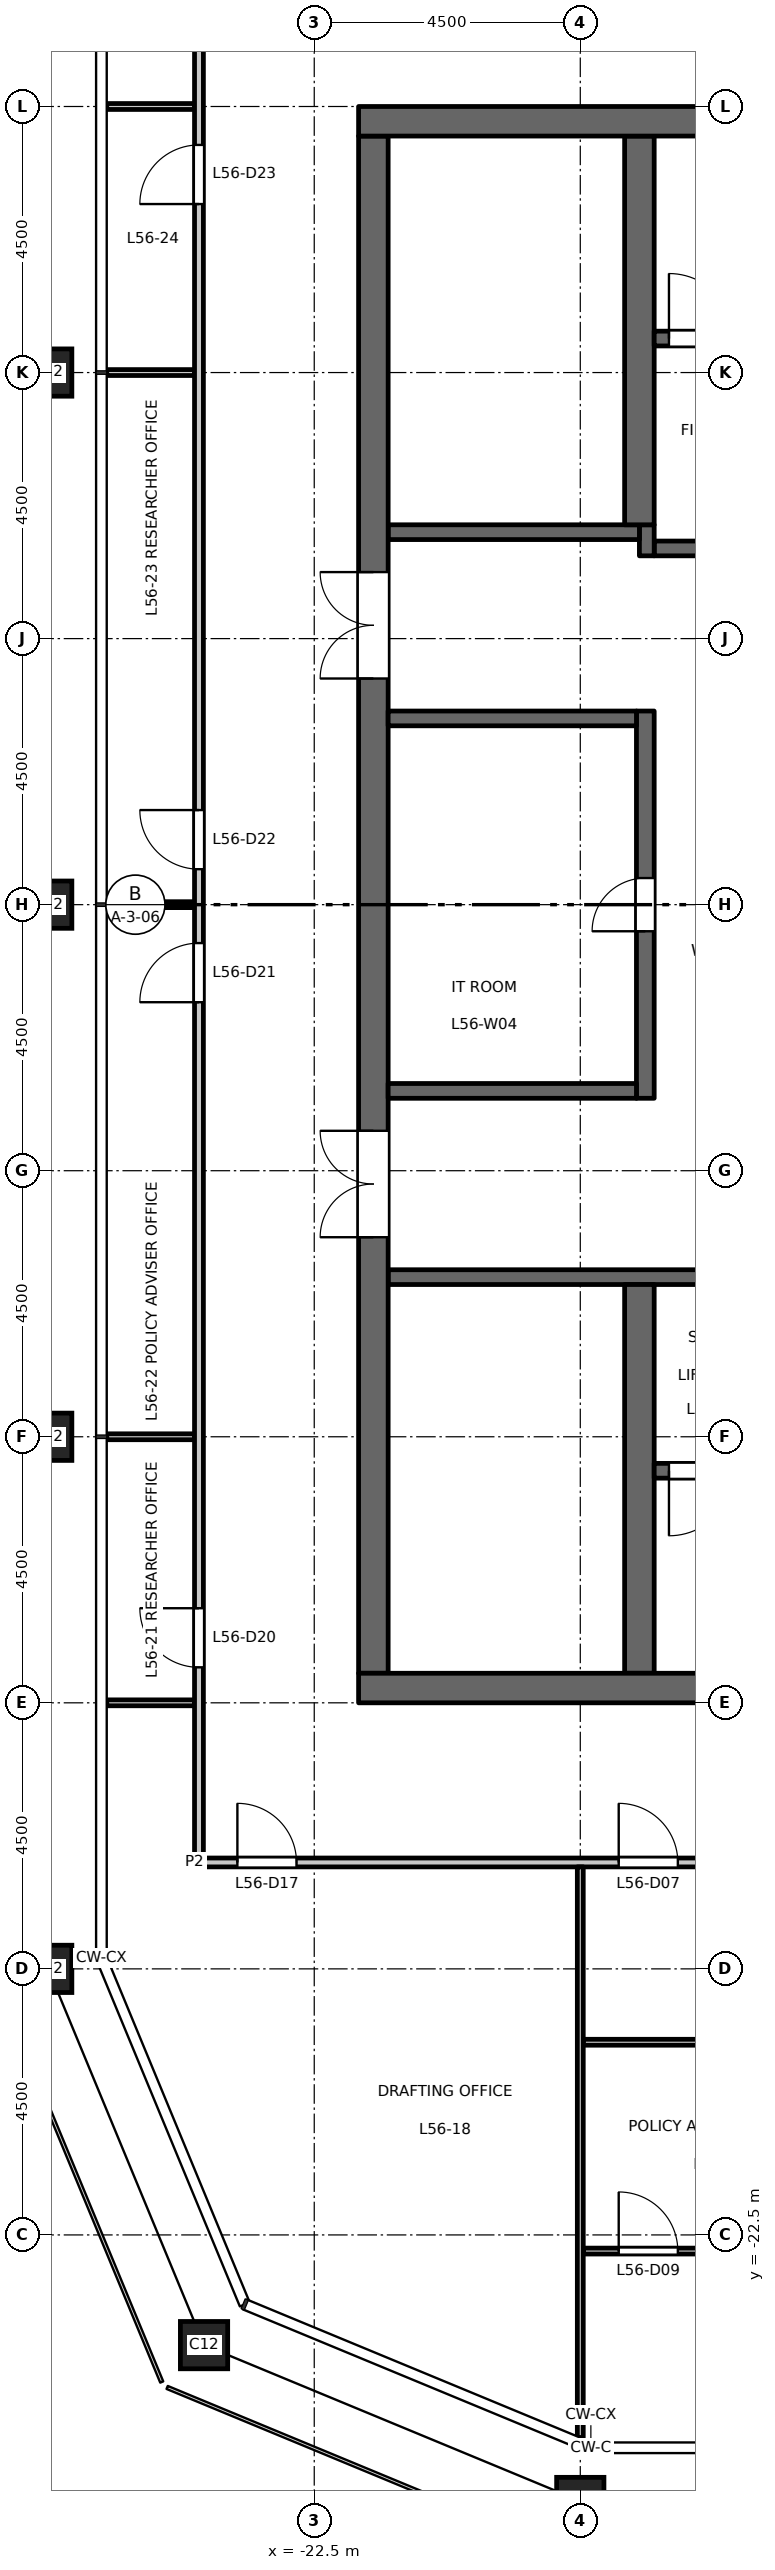
"""IFC4 building model, lengths in metres.
Left out: names, types, materials, properties, quantities, classifications, styles, units other than length and angle.
Written with IfcOpenShell. Run it as: python <this file> out.ifc"""

import sys

from ifc_helpers import new_model, si_unit, direction, frame, frame_2d, origin, origin_2d, place, context, subcontext, project, spatial, rectangle, hollow_rectangle, extrude, element, fill, save


model = new_model("IFC4")
c1 = context("Model", 3, precision=1e-05, world=origin(), true_north=direction((0.0, 1.0)))
c2 = subcontext(c1, "Body", "Model", "MODEL_VIEW")
j1 = project(units=[si_unit("LENGTHUNIT", "METRE"), si_unit("PLANEANGLEUNIT", "RADIAN")], contexts=[c1])
p1 = place(None, origin())
s1 = spatial("IfcSite", under=j1, at=p1, CompositionType="ELEMENT")
p2 = place(p1, origin())
s2 = spatial("IfcBuilding", under=s1, at=p2, CompositionType="ELEMENT")
p3 = place(p2, frame((0.0, 0.0, 260.2)))
s3 = spatial("IfcBuildingStorey", under=s2, at=p3, CompositionType="ELEMENT", Elevation=260.2)
for number, where, z_axis, x_axis in (
    (1, (-18.0, -27.0, 0.0), (0.0, 0.0, 1.0), (1.0, 0.0, 0.0)),
    (2, (-27.0, 9.0, 0.0), (0.0, 0.0, 1.0), (1.0, 0.0, 0.0)),
    (3, (-27.0, 0.0, 0.0), (0.0, 0.0, 1.0), (1.0, 0.0, 0.0)),
    (4, (-27.0, -9.0, 0.0), (0.0, 0.0, 1.0), (1.0, 0.0, 0.0)),
    (5, (-27.0, -18.0, 0.0), (0.0, 0.0, 1.0), (1.0, 0.0, 0.0)),
    (6, (-24.364, -24.364, 0.0), (0.0, 0.0, 1.0), (1.0, 0.0, 0.0)),
):
    element("IfcColumn", number, at=place(p3, frame(where, z_axis=z_axis, x_axis=x_axis)), inside=s3, PredefinedType="COLUMN", context=c2, shape_type="SweptSolid", body=[
        extrude(hollow_rectangle(XDim=0.8, YDim=0.8, WallThickness=0.045, at=origin_2d()), origin(), (0.0, 0.0, 1.0), 4.5),
    ])
p4 = place(p3, frame((-12.15, 6.025, 0.0), z_axis=(0.0, 0.0, 1.0), x_axis=(-1.0, 0.0, 0.0)))
e7 = element("IfcWall", 7, at=p4, inside=s3, PredefinedType="SHEAR", context=c2, shape_type="SweptSolid", body=[
    extrude(rectangle(XDim=4.6, YDim=0.25, at=frame_2d((2.3, 0.0))), origin(), (0.0, 0.0, 1.0), 4.35),
])
p5 = place(p4, frame((1.8, 0.0, 0.0)))
e8 = element("IfcOpeningElement", 8, at=p5, cuts=e7, PredefinedType="OPENING", context=c2, shape_type="SweptSolid", body=[
    extrude(rectangle(XDim=1.0, YDim=2.1, at=frame_2d((0.5, 1.05))), frame((0.0, 0.135, 0.0), z_axis=(0.0, -1.0, 0.0), x_axis=(1.0, 0.0, 0.0)), (0.0, 0.0, 1.0), 0.27),
])
p6 = place(p3, frame((-16.875, 5.9, 0.0), z_axis=(0.0, 0.0, 1.0), x_axis=(0.0, 1.0, 0.0)))
e9 = element("IfcWall", 9, at=p6, inside=s3, PredefinedType="SHEAR", context=c2, shape_type="SweptSolid", body=[
    extrude(rectangle(XDim=0.525, YDim=0.25, at=frame_2d((0.263, 0.0))), origin(), (0.0, 0.0, 1.0), 4.35),
])
p7 = place(p3, frame((-17.0, 6.3, 0.0), z_axis=(0.0, 0.0, 1.0), x_axis=(-1.0, 0.0, 0.0)))
e10 = element("IfcWall", 10, at=p7, inside=s3, PredefinedType="SHEAR", context=c2, shape_type="SweptSolid", body=[
    extrude(rectangle(XDim=4.25, YDim=0.25, at=frame_2d((2.125, 0.0))), origin(), (0.0, 0.0, 1.0), 4.35),
])
p8 = place(p3, frame((-12.15, -6.3, 0.0), z_axis=(0.0, 0.0, 1.0), x_axis=(-1.0, 0.0, 0.0)))
e11 = element("IfcWall", 11, at=p8, inside=s3, PredefinedType="SHEAR", context=c2, shape_type="SweptSolid", body=[
    extrude(rectangle(XDim=9.1, YDim=0.25, at=frame_2d((4.55, 0.0))), origin(), (0.0, 0.0, 1.0), 4.35),
])
p9 = place(p8, frame((1.8, 0.0, 0.0)))
e12 = element("IfcOpeningElement", 12, at=p9, cuts=e11, PredefinedType="OPENING", context=c2, shape_type="SweptSolid", body=[
    extrude(rectangle(XDim=1.0, YDim=2.1, at=frame_2d((0.5, 1.05))), frame((0.0, 0.135, 0.0), z_axis=(0.0, -1.0, 0.0), x_axis=(1.0, 0.0, 0.0)), (0.0, 0.0, 1.0), 0.27),
])
p10 = place(p3, frame((-21.5, -13.0, 0.0), z_axis=(0.0, 0.0, 1.0), x_axis=(0.0, 1.0, 0.0)))
e13 = element("IfcWall", 13, at=p10, inside=s3, PredefinedType="SHEAR", context=c2, shape_type="SweptSolid", body=[
    extrude(rectangle(XDim=26.0, YDim=0.5, at=frame_2d((13.0, 0.0))), origin(), (0.0, 0.0, 1.0), 4.35),
])
p11 = place(p10, frame((16.825, 0.0, 0.0)))
e14 = element("IfcOpeningElement", 14, at=p11, cuts=e13, PredefinedType="OPENING", context=c2, shape_type="SweptSolid", body=[
    extrude(rectangle(XDim=1.8, YDim=2.1, at=frame_2d((0.9, 1.05))), frame((0.0, 0.26, 0.0), z_axis=(0.0, -1.0, 0.0), x_axis=(1.0, 0.0, 0.0)), (0.0, 0.0, 1.0), 0.52),
])
p12 = place(p10, frame((7.375, 0.0, 0.0)))
e15 = element("IfcOpeningElement", 15, at=p12, cuts=e13, PredefinedType="OPENING", context=c2, shape_type="SweptSolid", body=[
    extrude(rectangle(XDim=1.8, YDim=2.1, at=frame_2d((0.9, 1.05))), frame((0.0, 0.26, 0.0), z_axis=(0.0, -1.0, 0.0), x_axis=(1.0, 0.0, 0.0)), (0.0, 0.0, 1.0), 0.52),
])
p13 = place(p3, frame((-16.9, -3.275, 0.0), z_axis=(0.0, 0.0, 1.0), x_axis=(0.0, 1.0, 0.0)))
e16 = element("IfcWall", 16, at=p13, inside=s3, PredefinedType="SHEAR", context=c2, shape_type="SweptSolid", body=[
    extrude(rectangle(XDim=6.55, YDim=0.3, at=frame_2d((3.275, 0.0))), origin(), (0.0, 0.0, 1.0), 4.35),
])
p14 = place(p13, frame((2.825, 0.0, 0.0)))
e17 = element("IfcOpeningElement", 17, at=p14, cuts=e16, PredefinedType="OPENING", context=c2, shape_type="SweptSolid", body=[
    extrude(rectangle(XDim=0.9, YDim=2.1, at=frame_2d((0.45, 1.05))), frame((0.0, 0.16, 0.0), z_axis=(0.0, -1.0, 0.0), x_axis=(1.0, 0.0, 0.0)), (0.0, 0.0, 1.0), 0.32),
])
for number, where, z_axis, x_axis in (
    (18, (-17.05, 3.15, 0.0), (0.0, 0.0, 1.0), (-1.0, 0.0, 0.0)),
    (19, (-17.05, -3.15, 0.0), (0.0, 0.0, 1.0), (-1.0, 0.0, 0.0)),
):
    element("IfcWall", number, at=place(p3, frame(where, z_axis=z_axis, x_axis=x_axis)), inside=s3, PredefinedType="SHEAR", context=c2, shape_type="SweptSolid", body=[
        extrude(rectangle(XDim=4.2, YDim=0.25, at=frame_2d((2.1, 0.0))), origin(), (0.0, 0.0, 1.0), 4.35),
    ])
for number, where, z_axis, x_axis in (
    (20, (-17.0, 6.425, 0.0), (0.0, 0.0, 1.0), (0.0, 1.0, 0.0)),
    (21, (-17.0, -13.0, 0.0), (0.0, 0.0, 1.0), (0.0, 1.0, 0.0)),
):
    element("IfcWall", number, at=place(p3, frame(where, z_axis=z_axis, x_axis=x_axis)), inside=s3, PredefinedType="SHEAR", context=c2, shape_type="SweptSolid", body=[
        extrude(rectangle(XDim=6.575, YDim=0.5, at=frame_2d((3.288, 0.0))), origin(), (0.0, 0.0, 1.0), 4.35),
    ])
p15 = place(p3, frame((-8.75, 9.575, 0.0), z_axis=(0.0, 0.0, 1.0), x_axis=(-1.0, 0.0, 0.0)))
e22 = element("IfcWall", 22, at=p15, inside=s3, PredefinedType="SHEAR", context=c2, shape_type="SweptSolid", body=[
    extrude(rectangle(XDim=8.0, YDim=0.25, at=frame_2d((4.0, 0.0))), origin(), (0.0, 0.0, 1.0), 4.35),
])
p16 = place(p15, frame((6.65, 0.0, 0.0)))
e23 = element("IfcOpeningElement", 23, at=p16, cuts=e22, PredefinedType="OPENING", context=c2, shape_type="SweptSolid", body=[
    extrude(rectangle(XDim=1.1, YDim=2.1, at=frame_2d((0.55, 1.05))), frame((0.0, 0.135, 0.0), z_axis=(0.0, -1.0, 0.0), x_axis=(1.0, 0.0, 0.0)), (0.0, 0.0, 1.0), 0.27),
])
p17 = place(p3, frame((-8.75, -9.575, 0.0), z_axis=(0.0, 0.0, 1.0), x_axis=(-1.0, 0.0, 0.0)))
e24 = element("IfcWall", 24, at=p17, inside=s3, PredefinedType="SHEAR", context=c2, shape_type="SweptSolid", body=[
    extrude(rectangle(XDim=8.0, YDim=0.25, at=frame_2d((4.0, 0.0))), origin(), (0.0, 0.0, 1.0), 4.35),
])
p18 = place(p17, frame((6.65, 0.0, 0.0)))
e25 = element("IfcOpeningElement", 25, at=p18, cuts=e24, PredefinedType="OPENING", context=c2, shape_type="SweptSolid", body=[
    extrude(rectangle(XDim=1.1, YDim=2.1, at=frame_2d((0.55, 1.05))), frame((0.0, 0.135, 0.0), z_axis=(0.0, -1.0, 0.0), x_axis=(1.0, 0.0, 0.0)), (0.0, 0.0, 1.0), 0.27),
])
for number, where, z_axis, x_axis in (
    (26, (-8.25, 13.25, 0.0), (0.0, 0.0, 1.0), (-1.0, 0.0, 0.0)),
    (27, (-8.25, -13.25, 0.0), (0.0, 0.0, 1.0), (-1.0, 0.0, 0.0)),
):
    element("IfcWall", number, at=place(p3, frame(where, z_axis=z_axis, x_axis=x_axis)), inside=s3, PredefinedType="SHEAR", context=c2, shape_type="SweptSolid", body=[
        extrude(rectangle(XDim=13.5, YDim=0.5, at=frame_2d((6.75, 0.0))), origin(), (0.0, 0.0, 1.0), 4.35),
    ])
p19 = place(p3, frame((-17.95, -22.773, 0.0), z_axis=(0.0, 0.0, 1.0), x_axis=(1.0, 0.0, 0.0)))
e28 = element("IfcWall", 28, at=p19, inside=s3, PredefinedType="PARTITIONING", context=c2, shape_type="SweptSolid", body=[
    extrude(rectangle(XDim=8.9, YDim=0.1, at=frame_2d((4.45, 0.0))), origin(), (0.0, 0.0, 1.0), 4.35),
])
p20 = place(p19, frame((0.6, 0.0, 0.0)))
e29 = element("IfcOpeningElement", 29, at=p20, cuts=e28, PredefinedType="OPENING", context=c2, shape_type="SweptSolid", body=[
    extrude(rectangle(XDim=1.0, YDim=2.1, at=frame_2d((0.5, 1.05))), frame((0.0, 0.06, 0.0), z_axis=(0.0, -1.0, 0.0), x_axis=(1.0, 0.0, 0.0)), (0.0, 0.0, 1.0), 0.12),
])
p21 = place(p3, frame((-17.95, -19.241, 0.0), z_axis=(0.0, 0.0, 1.0), x_axis=(1.0, 0.0, 0.0)))
e30 = element("IfcWall", 30, at=p21, inside=s3, PredefinedType="PARTITIONING", context=c2, shape_type="SweptSolid", body=[
    extrude(rectangle(XDim=8.9, YDim=0.1, at=frame_2d((4.45, 0.0))), origin(), (0.0, 0.0, 1.0), 4.35),
])
p22 = place(p21, frame((7.35, 0.0, 0.0)))
e31 = element("IfcOpeningElement", 31, at=p22, cuts=e30, PredefinedType="OPENING", context=c2, shape_type="SweptSolid", body=[
    extrude(rectangle(XDim=1.0, YDim=2.1, at=frame_2d((0.5, 1.05))), frame((0.0, 0.06, 0.0), z_axis=(0.0, -1.0, 0.0), x_axis=(1.0, 0.0, 0.0)), (0.0, 0.0, 1.0), 0.12),
])
p23 = place(p3, frame((-24.525, -16.2, 0.0), z_axis=(0.0, 0.0, 1.0), x_axis=(1.0, 0.0, 0.0)))
e32 = element("IfcWall", 32, at=p23, inside=s3, PredefinedType="PARTITIONING", context=c2, shape_type="SweptSolid", body=[
    extrude(rectangle(XDim=49.05, YDim=0.15, at=frame_2d((24.525, 0.0))), origin(), (0.0, 0.0, 1.0), 4.35),
])
p24 = place(p23, frame((7.175, 0.0, 0.0)))
e33 = element("IfcOpeningElement", 33, at=p24, cuts=e32, PredefinedType="OPENING", context=c2, shape_type="SweptSolid", body=[
    extrude(rectangle(XDim=1.0, YDim=2.1, at=frame_2d((0.5, 1.05))), frame((0.0, 0.085, 0.0), z_axis=(0.0, -1.0, 0.0), x_axis=(1.0, 0.0, 0.0)), (0.0, 0.0, 1.0), 0.17),
])
p25 = place(p23, frame((22.925, 0.0, 0.0)))
e34 = element("IfcOpeningElement", 34, at=p25, cuts=e32, PredefinedType="OPENING", context=c2, shape_type="SweptSolid", body=[
    extrude(rectangle(XDim=1.0, YDim=2.1, at=frame_2d((0.5, 1.05))), frame((0.0, 0.085, 0.0), z_axis=(0.0, -1.0, 0.0), x_axis=(1.0, 0.0, 0.0)), (0.0, 0.0, 1.0), 0.17),
])
p26 = place(p23, frame((25.175, 0.0, 0.0)))
e35 = element("IfcOpeningElement", 35, at=p26, cuts=e32, PredefinedType="OPENING", context=c2, shape_type="SweptSolid", body=[
    extrude(rectangle(XDim=1.0, YDim=2.1, at=frame_2d((0.5, 1.05))), frame((0.0, 0.085, 0.0), z_axis=(0.0, -1.0, 0.0), x_axis=(1.0, 0.0, 0.0)), (0.0, 0.0, 1.0), 0.17),
])
p27 = place(p23, frame((36.425, 0.0, 0.0)))
e36 = element("IfcOpeningElement", 36, at=p27, cuts=e32, PredefinedType="OPENING", context=c2, shape_type="SweptSolid", body=[
    extrude(rectangle(XDim=1.0, YDim=2.1, at=frame_2d((0.5, 1.05))), frame((0.0, 0.085, 0.0), z_axis=(0.0, -1.0, 0.0), x_axis=(1.0, 0.0, 0.0)), (0.0, 0.0, 1.0), 0.17),
])
p28 = place(p23, frame((38.675, 0.0, 0.0)))
e37 = element("IfcOpeningElement", 37, at=p28, cuts=e32, PredefinedType="OPENING", context=c2, shape_type="SweptSolid", body=[
    extrude(rectangle(XDim=1.0, YDim=2.1, at=frame_2d((0.5, 1.05))), frame((0.0, 0.085, 0.0), z_axis=(0.0, -1.0, 0.0), x_axis=(1.0, 0.0, 0.0)), (0.0, 0.0, 1.0), 0.17),
])
p29 = place(p23, frame((0.725, 0.0, 0.0)))
e38 = element("IfcOpeningElement", 38, at=p29, cuts=e32, PredefinedType="OPENING", context=c2, shape_type="SweptSolid", body=[
    extrude(rectangle(XDim=1.0, YDim=2.1, at=frame_2d((0.5, 1.05))), frame((0.0, 0.085, 0.0), z_axis=(0.0, -1.0, 0.0), x_axis=(1.0, 0.0, 0.0)), (0.0, 0.0, 1.0), 0.17),
])
p30 = place(p3, frame((-26.01, -13.5, 0.0), z_axis=(0.0, 0.0, 1.0), x_axis=(1.0, 0.0, 0.0)))
e39 = element("IfcWall", 39, at=p30, inside=s3, PredefinedType="PARTITIONING", context=c2, shape_type="SweptSolid", body=[
    extrude(rectangle(XDim=1.485, YDim=0.1, at=frame_2d((0.743, 0.0))), origin(), (0.0, 0.0, 1.0), 3.95),
])
for number, where, z_axis, x_axis in (
    (40, (-26.01, -9.0, 0.0), (0.0, 0.0, 1.0), (1.0, 0.0, 0.0)),
    (41, (-26.01, 0.0, 0.0), (0.0, 0.0, 1.0), (1.0, 0.0, 0.0)),
    (42, (-26.01, 9.0, 0.0), (0.0, 0.0, 1.0), (1.0, 0.0, 0.0)),
    (43, (-26.01, 13.5, 0.0), (0.0, 0.0, 1.0), (1.0, 0.0, 0.0)),
):
    element("IfcWall", number, at=place(p3, frame(where, z_axis=z_axis, x_axis=x_axis)), inside=s3, PredefinedType="PARTITIONING", context=c2, shape_type="SweptSolid", body=[
        extrude(rectangle(XDim=1.485, YDim=0.1, at=frame_2d((0.743, 0.0))), origin(), (0.0, 0.0, 1.0), 4.35),
    ])
p31 = place(p3, frame((-24.45, -16.125, 0.0), z_axis=(0.0, 0.0, 1.0), x_axis=(0.0, 1.0, 0.0)))
e44 = element("IfcWall", 44, at=p31, inside=s3, PredefinedType="PARTITIONING", context=c2, shape_type="SweptSolid", body=[
    extrude(rectangle(XDim=32.25, YDim=0.15, at=frame_2d((16.125, 0.0))), origin(), (0.0, 0.0, 1.0), 4.35),
])
p32 = place(p31, frame((3.225, 0.0, 0.0)))
e45 = element("IfcOpeningElement", 45, at=p32, cuts=e44, PredefinedType="OPENING", context=c2, shape_type="SweptSolid", body=[
    extrude(rectangle(XDim=1.0, YDim=2.1, at=frame_2d((0.5, 1.05))), frame((0.0, 0.085, 0.0), z_axis=(0.0, -1.0, 0.0), x_axis=(1.0, 0.0, 0.0)), (0.0, 0.0, 1.0), 0.17),
])
p33 = place(p31, frame((14.475, 0.0, 0.0)))
e46 = element("IfcOpeningElement", 46, at=p33, cuts=e44, PredefinedType="OPENING", context=c2, shape_type="SweptSolid", body=[
    extrude(rectangle(XDim=1.0, YDim=2.1, at=frame_2d((0.5, 1.05))), frame((0.0, 0.085, 0.0), z_axis=(0.0, -1.0, 0.0), x_axis=(1.0, 0.0, 0.0)), (0.0, 0.0, 1.0), 0.17),
])
p34 = place(p31, frame((16.725, 0.0, 0.0)))
e47 = element("IfcOpeningElement", 47, at=p34, cuts=e44, PredefinedType="OPENING", context=c2, shape_type="SweptSolid", body=[
    extrude(rectangle(XDim=1.0, YDim=2.1, at=frame_2d((0.5, 1.05))), frame((0.0, 0.085, 0.0), z_axis=(0.0, -1.0, 0.0), x_axis=(1.0, 0.0, 0.0)), (0.0, 0.0, 1.0), 0.17),
])
p35 = place(p31, frame((27.975, 0.0, 0.0)))
e48 = element("IfcOpeningElement", 48, at=p35, cuts=e44, PredefinedType="OPENING", context=c2, shape_type="SweptSolid", body=[
    extrude(rectangle(XDim=1.0, YDim=2.1, at=frame_2d((0.5, 1.05))), frame((0.0, 0.085, 0.0), z_axis=(0.0, -1.0, 0.0), x_axis=(1.0, 0.0, 0.0)), (0.0, 0.0, 1.0), 0.17),
])
p36 = place(p3, frame((-18.0, -25.928, 0.0), z_axis=(0.0, 0.0, 1.0), x_axis=(0.0, 1.0, 0.0)))
e49 = element("IfcWall", 49, at=p36, inside=s3, PredefinedType="PARTITIONING", context=c2, shape_type="SweptSolid", body=[
    extrude(rectangle(XDim=9.653, YDim=0.1, at=frame_2d((4.827, 0.0))), origin(), (0.0, 0.0, 1.0), 3.65),
])
p37 = place(p16, origin())
e50 = element("IfcDoor", 50, at=p37, inside=s3, OperationType="SINGLE_SWING_RIGHT", PredefinedType="DOOR", context=c2, shape_type="SweptSolid", body=[
    extrude(rectangle(XDim=1.1, YDim=2.1, at=frame_2d((0.55, 1.05))), frame((0.0, 0.025, 0.0), z_axis=(0.0, -1.0, 0.0), x_axis=(1.0, 0.0, 0.0)), (0.0, 0.0, 1.0), 0.05),
])
fill(e23, e50)
p38 = place(p18, origin())
e51 = element("IfcDoor", 51, at=p38, inside=s3, OperationType="SINGLE_SWING_LEFT", PredefinedType="DOOR", context=c2, shape_type="SweptSolid", body=[
    extrude(rectangle(XDim=1.1, YDim=2.1, at=frame_2d((0.55, 1.05))), frame((0.0, 0.025, 0.0), z_axis=(0.0, -1.0, 0.0), x_axis=(1.0, 0.0, 0.0)), (0.0, 0.0, 1.0), 0.05),
])
fill(e25, e51)
p39 = place(p11, origin())
e52 = element("IfcDoor", 52, at=p39, inside=s3, OperationType="DOUBLE_DOOR_DOUBLE_SWING", PredefinedType="DOOR", context=c2, shape_type="SweptSolid", body=[
    extrude(rectangle(XDim=1.8, YDim=2.1, at=frame_2d((0.9, 1.05))), frame((0.0, 0.025, 0.0), z_axis=(0.0, -1.0, 0.0), x_axis=(1.0, 0.0, 0.0)), (0.0, 0.0, 1.0), 0.05),
])
fill(e14, e52)
p40 = place(p12, origin())
e53 = element("IfcDoor", 53, at=p40, inside=s3, OperationType="DOUBLE_DOOR_DOUBLE_SWING", PredefinedType="DOOR", context=c2, shape_type="SweptSolid", body=[
    extrude(rectangle(XDim=1.8, YDim=2.1, at=frame_2d((0.9, 1.05))), frame((0.0, 0.025, 0.0), z_axis=(0.0, -1.0, 0.0), x_axis=(1.0, 0.0, 0.0)), (0.0, 0.0, 1.0), 0.05),
])
fill(e15, e53)
p41 = place(p14, origin())
e54 = element("IfcDoor", 54, at=p41, inside=s3, OperationType="SINGLE_SWING_RIGHT", PredefinedType="DOOR", context=c2, shape_type="SweptSolid", body=[
    extrude(rectangle(XDim=0.9, YDim=2.1, at=frame_2d((0.45, 1.05))), frame((0.0, 0.025, 0.0), z_axis=(0.0, -1.0, 0.0), x_axis=(1.0, 0.0, 0.0)), (0.0, 0.0, 1.0), 0.05),
])
fill(e17, e54)
p42 = place(p24, origin())
e55 = element("IfcDoor", 55, at=p42, inside=s3, OperationType="SINGLE_SWING_LEFT", PredefinedType="DOOR", context=c2, shape_type="SweptSolid", body=[
    extrude(rectangle(XDim=1.0, YDim=2.1, at=frame_2d((0.5, 1.05))), frame((0.0, 0.025, 0.0), z_axis=(0.0, -1.0, 0.0), x_axis=(1.0, 0.0, 0.0)), (0.0, 0.0, 1.0), 0.05),
])
fill(e33, e55)
p43 = place(p20, origin())
e56 = element("IfcDoor", 56, at=p43, inside=s3, OperationType="SINGLE_SWING_LEFT", PredefinedType="DOOR", context=c2, shape_type="SweptSolid", body=[
    extrude(rectangle(XDim=1.0, YDim=2.1, at=frame_2d((0.5, 1.05))), frame((0.0, 0.025, 0.0), z_axis=(0.0, -1.0, 0.0), x_axis=(1.0, 0.0, 0.0)), (0.0, 0.0, 1.0), 0.05),
])
fill(e29, e56)
p44 = place(p29, origin())
e57 = element("IfcDoor", 57, at=p44, inside=s3, OperationType="SINGLE_SWING_LEFT", PredefinedType="DOOR", context=c2, shape_type="SweptSolid", body=[
    extrude(rectangle(XDim=1.0, YDim=2.1, at=frame_2d((0.5, 1.05))), frame((0.0, 0.025, 0.0), z_axis=(0.0, -1.0, 0.0), x_axis=(1.0, 0.0, 0.0)), (0.0, 0.0, 1.0), 0.05),
])
fill(e38, e57)
p45 = place(p32, origin())
e58 = element("IfcDoor", 58, at=p45, inside=s3, OperationType="SINGLE_SWING_RIGHT", PredefinedType="DOOR", context=c2, shape_type="SweptSolid", body=[
    extrude(rectangle(XDim=1.0, YDim=2.1, at=frame_2d((0.5, 1.05))), frame((0.0, 0.025, 0.0), z_axis=(0.0, -1.0, 0.0), x_axis=(1.0, 0.0, 0.0)), (0.0, 0.0, 1.0), 0.05),
])
fill(e45, e58)
p46 = place(p33, origin())
e59 = element("IfcDoor", 59, at=p46, inside=s3, OperationType="SINGLE_SWING_LEFT", PredefinedType="DOOR", context=c2, shape_type="SweptSolid", body=[
    extrude(rectangle(XDim=1.0, YDim=2.1, at=frame_2d((0.5, 1.05))), frame((0.0, 0.025, 0.0), z_axis=(0.0, -1.0, 0.0), x_axis=(1.0, 0.0, 0.0)), (0.0, 0.0, 1.0), 0.05),
])
fill(e46, e59)
p47 = place(p34, origin())
e60 = element("IfcDoor", 60, at=p47, inside=s3, OperationType="SINGLE_SWING_RIGHT", PredefinedType="DOOR", context=c2, shape_type="SweptSolid", body=[
    extrude(rectangle(XDim=1.0, YDim=2.1, at=frame_2d((0.5, 1.05))), frame((0.0, 0.025, 0.0), z_axis=(0.0, -1.0, 0.0), x_axis=(1.0, 0.0, 0.0)), (0.0, 0.0, 1.0), 0.05),
])
fill(e47, e60)
p48 = place(p35, origin())
e61 = element("IfcDoor", 61, at=p48, inside=s3, OperationType="SINGLE_SWING_LEFT", PredefinedType="DOOR", context=c2, shape_type="SweptSolid", body=[
    extrude(rectangle(XDim=1.0, YDim=2.1, at=frame_2d((0.5, 1.05))), frame((0.0, 0.025, 0.0), z_axis=(0.0, -1.0, 0.0), x_axis=(1.0, 0.0, 0.0)), (0.0, 0.0, 1.0), 0.05),
])
fill(e48, e61)
save(model, sys.argv[1])
